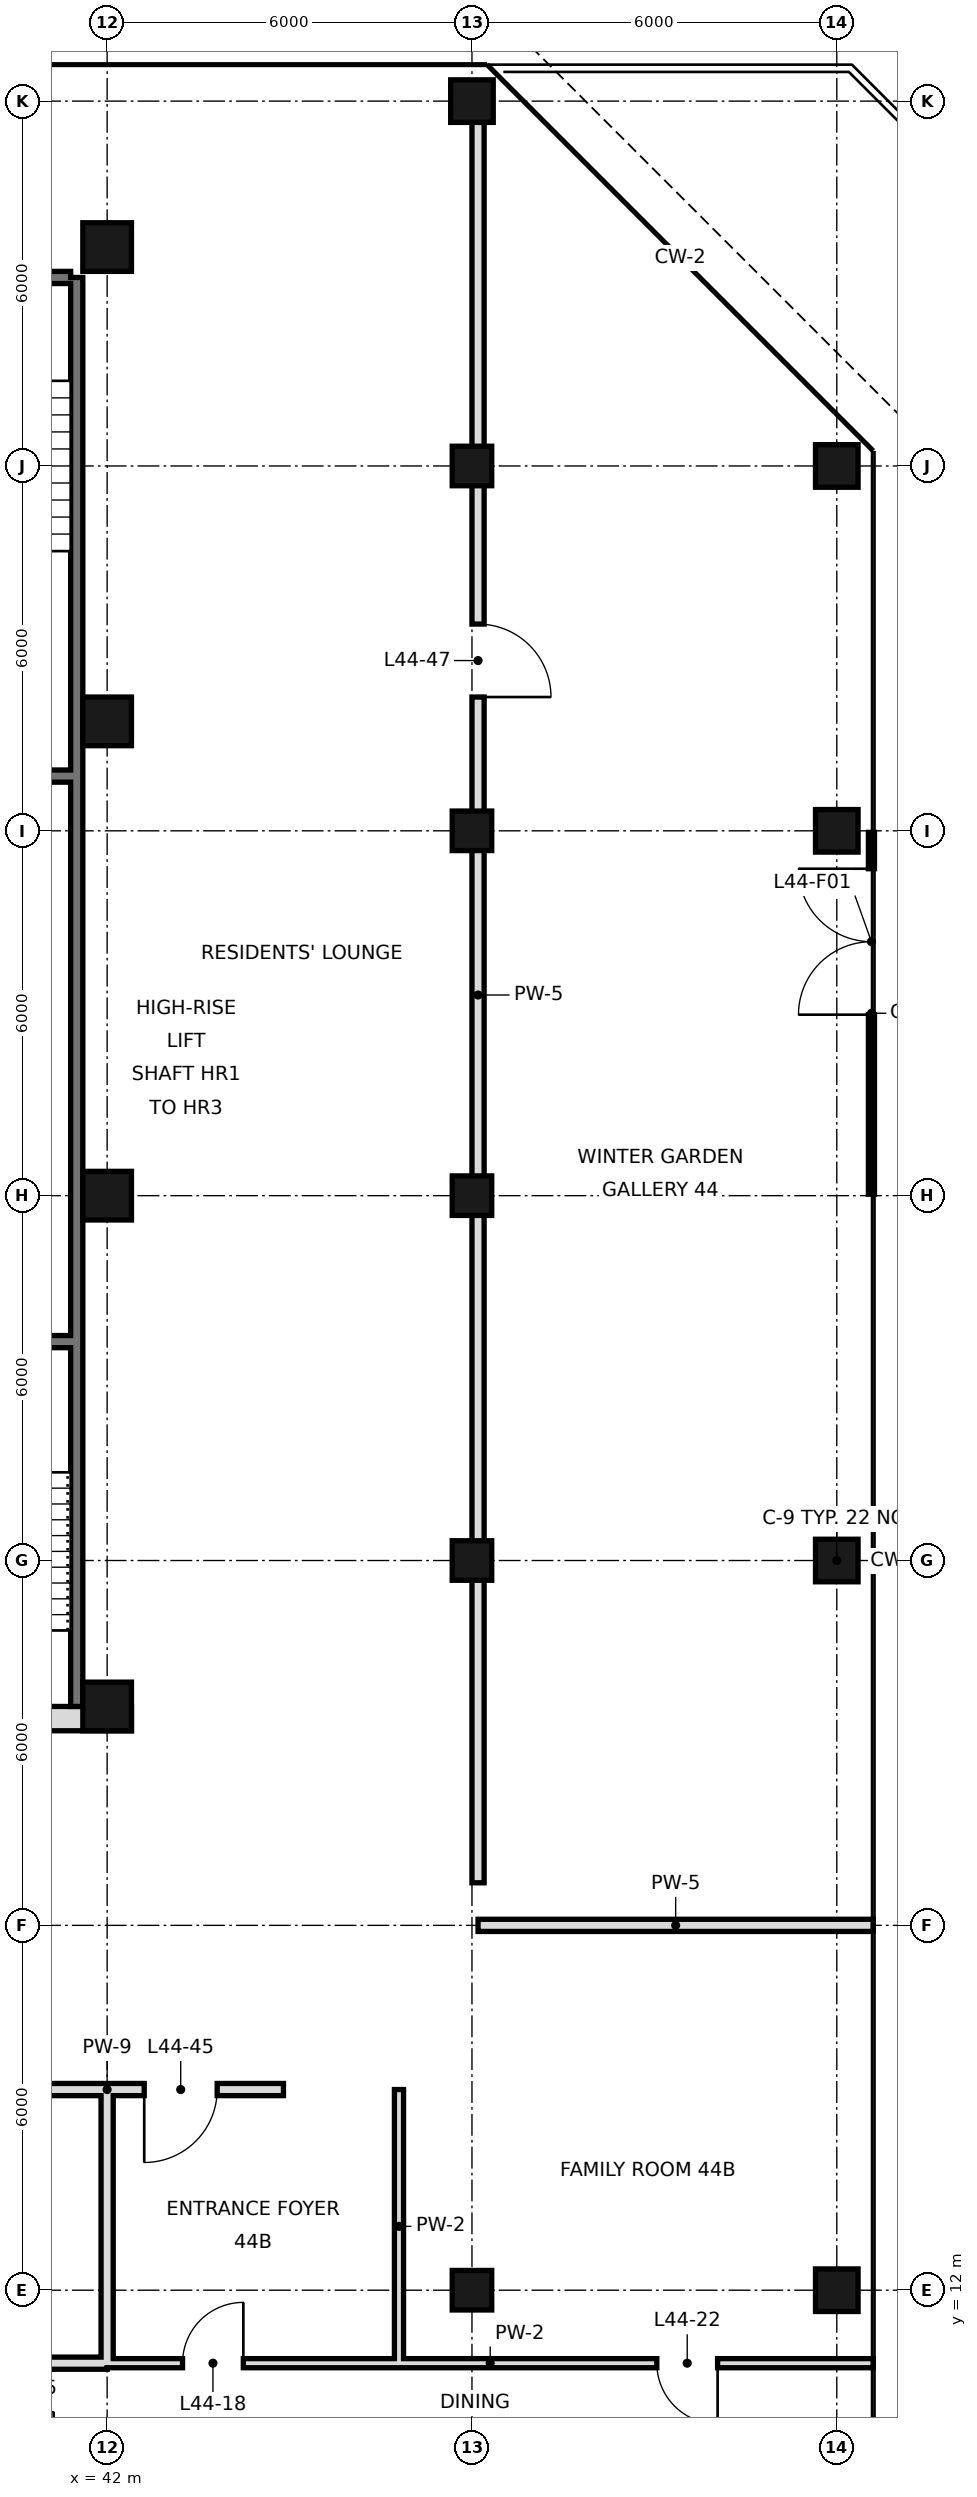
"""IFC4 building model, lengths in metres.
Left out: names, types, materials, properties, quantities, classifications, styles, units other than length and angle.
Written with IfcOpenShell. Run it as: python <this file> out.ifc"""

import sys

from ifc_helpers import new_model, si_unit, direction, frame, frame_2d, origin, origin_2d, place, context, subcontext, project, spatial, rectangle, hollow_rectangle, extrude, element, fill, save


model = new_model("IFC4")
c1 = context("Model", 3, precision=1e-05, world=origin(), true_north=direction((0.0, 1.0)))
c2 = subcontext(c1, "Body", "Model", "MODEL_VIEW")
j1 = project(units=[si_unit("LENGTHUNIT", "METRE"), si_unit("PLANEANGLEUNIT", "RADIAN")], contexts=[c1])
p1 = place(None, origin())
s1 = spatial("IfcSite", under=j1, at=p1, CompositionType="ELEMENT")
p2 = place(p1, origin())
s2 = spatial("IfcBuilding", under=s1, at=p2, CompositionType="ELEMENT")
p3 = place(p2, frame((0.0, 0.0, 192.0)))
s3 = spatial("IfcBuildingStorey", under=s2, at=p3, CompositionType="ELEMENT", Elevation=192.0)
for number, where, z_axis, x_axis in (
    (1, (42.0, 21.6, 0.0), (0.0, 0.0, 1.0), (1.0, 0.0, 0.0)),
    (2, (42.0, 30.0, 0.0), (0.0, 0.0, 1.0), (1.0, 0.0, 0.0)),
    (3, (42.0, 37.8, 0.0), (0.0, 0.0, 1.0), (1.0, 0.0, 0.0)),
    (4, (42.0, 45.6, 0.0), (0.0, 0.0, 1.0), (1.0, 0.0, 0.0)),
):
    element("IfcColumn", number, at=place(p3, frame(where, z_axis=z_axis, x_axis=x_axis)), inside=s3, PredefinedType="COLUMN", context=c2, shape_type="SweptSolid", body=[
        extrude(hollow_rectangle(XDim=0.8, YDim=0.8, WallThickness=0.045, at=origin_2d()), origin(), (0.0, 0.0, 1.0), 3.6),
    ])
for number, where, z_axis, x_axis in (
    (5, (48.0, 12.0, 0.0), (0.0, 0.0, 1.0), (1.0, 0.0, 0.0)),
    (6, (48.0, 24.0, 0.0), (0.0, 0.0, 1.0), (1.0, 0.0, 0.0)),
    (7, (48.0, 30.0, 0.0), (0.0, 0.0, 1.0), (1.0, 0.0, 0.0)),
    (8, (48.0, 36.0, 0.0), (0.0, 0.0, 1.0), (1.0, 0.0, 0.0)),
    (9, (48.0, 42.0, 0.0), (0.0, 0.0, 1.0), (1.0, 0.0, 0.0)),
):
    element("IfcColumn", number, at=place(p3, frame(where, z_axis=z_axis, x_axis=x_axis)), inside=s3, PredefinedType="COLUMN", context=c2, shape_type="SweptSolid", body=[
        extrude(hollow_rectangle(XDim=0.65, YDim=0.65, WallThickness=0.032, at=origin_2d()), origin(), (0.0, 0.0, 1.0), 3.6),
    ])
p4 = place(p3, frame((48.0, 48.0, 0.0), z_axis=(0.0, 0.0, 1.0), x_axis=(1.0, 0.0, 0.0)))
e10 = element("IfcColumn", 10, at=p4, inside=s3, PredefinedType="COLUMN", context=c2, shape_type="SweptSolid", body=[
    extrude(hollow_rectangle(XDim=0.7, YDim=0.7, WallThickness=0.036, at=origin_2d()), origin(), (0.0, 0.0, 1.0), 3.6),
])
for number, where, z_axis, x_axis in (
    (11, (54.0, 12.0, -0.3), (0.0, 0.0, 1.0), (1.0, 0.0, 0.0)),
    (12, (54.0, 24.0, -0.3), (0.0, 0.0, 1.0), (1.0, 0.0, 0.0)),
    (13, (54.0, 36.0, -0.3), (0.0, 0.0, 1.0), (1.0, 0.0, 0.0)),
    (14, (54.0, 42.0, -0.3), (0.0, 0.0, 1.0), (1.0, 0.0, 0.0)),
):
    element("IfcColumn", number, at=place(p3, frame(where, z_axis=z_axis, x_axis=x_axis)), inside=s3, PredefinedType="COLUMN", context=c2, shape_type="SweptSolid", body=[
        extrude(hollow_rectangle(XDim=0.7, YDim=0.7, WallThickness=0.036, at=origin_2d()), origin(), (0.0, 0.0, 1.0), 3.9),
    ])
p5 = place(p3, frame((54.57, 30.025, 0.0), z_axis=(0.0, 0.0, 1.0), x_axis=(0.0, 1.0, 0.0)))
e15 = element("IfcWall", 15, at=p5, inside=s3, PredefinedType="SOLIDWALL", context=c2, shape_type="SweptSolid", body=[
    extrude(rectangle(XDim=5.95, YDim=0.1, at=frame_2d((2.975, 0.0))), origin(), (0.0, 0.0, 1.0), 3.42),
])
p6 = place(p5, frame((2.951, 0.0, 0.0)))
e16 = element("IfcOpeningElement", 16, at=p6, cuts=e15, PredefinedType="OPENING", context=c2, shape_type="SweptSolid", body=[
    extrude(rectangle(XDim=2.4, YDim=2.4, at=frame_2d((1.2, 1.2))), frame((0.0, 0.06, 0.0), z_axis=(0.0, -1.0, 0.0), x_axis=(1.0, 0.0, 0.0)), (0.0, 0.0, 1.0), 0.12),
])
p7 = place(p3, frame((42.0, 10.8, 0.0), z_axis=(0.0, 0.0, 1.0), x_axis=(0.0, 1.0, 0.0)))
e17 = element("IfcWall", 17, at=p7, inside=s3, PredefinedType="SOLIDWALL", context=c2, shape_type="SweptSolid", body=[
    extrude(rectangle(XDim=4.5, YDim=0.2, at=frame_2d((2.25, 0.0))), origin(), (0.0, 0.0, 1.0), 2.72),
])
p8 = place(p3, frame((46.8, 10.8, 0.0), z_axis=(0.0, 0.0, 1.0), x_axis=(0.0, 1.0, 0.0)))
e18 = element("IfcWall", 18, at=p8, inside=s3, PredefinedType="PARTITIONING", context=c2, shape_type="SweptSolid", body=[
    extrude(rectangle(XDim=4.5, YDim=0.15, at=frame_2d((2.25, 0.0))), origin(), (0.0, 0.0, 1.0), 3.42),
])
p9 = place(p3, frame((48.1, 18.7, 0.0), z_axis=(0.0, 0.0, 1.0), x_axis=(0.0, 1.0, 0.0)))
e19 = element("IfcWall", 19, at=p9, inside=s3, PredefinedType="SOLIDWALL", context=c2, shape_type="SweptSolid", body=[
    extrude(rectangle(XDim=29.2, YDim=0.2, at=frame_2d((14.6, 0.0))), origin(), (0.0, 0.0, 1.0), 2.72),
])
p10 = place(p9, frame((19.5, 0.0, 0.0)))
e20 = element("IfcOpeningElement", 20, at=p10, cuts=e19, PredefinedType="OPENING", context=c2, shape_type="SweptSolid", body=[
    extrude(rectangle(XDim=1.2, YDim=2.4, at=frame_2d((0.6, 1.2))), frame((0.0, 0.11, 0.0), z_axis=(0.0, -1.0, 0.0), x_axis=(1.0, 0.0, 0.0)), (0.0, 0.0, 1.0), 0.22),
])
p11 = place(p3, frame((36.6, 10.8, 0.0), z_axis=(0.0, 0.0, 1.0), x_axis=(1.0, 0.0, 0.0)))
e21 = element("IfcWall", 21, at=p11, inside=s3, PredefinedType="SOLIDWALL", context=c2, shape_type="SweptSolid", body=[
    extrude(rectangle(XDim=5.4, YDim=0.2, at=frame_2d((2.7, 0.0))), origin(), (0.0, 0.0, 1.0), 2.72),
])
p12 = place(p11, frame((2.98, 0.0, 0.0)))
e22 = element("IfcOpeningElement", 22, at=p12, cuts=e21, PredefinedType="OPENING", context=c2, shape_type="SweptSolid", body=[
    extrude(rectangle(XDim=1.0, YDim=2.4, at=frame_2d((0.5, 1.2))), frame((0.0, 0.11, 0.0), z_axis=(0.0, -1.0, 0.0), x_axis=(1.0, 0.0, 0.0)), (0.0, 0.0, 1.0), 0.22),
])
p13 = place(p3, frame((42.0, 10.8, 0.0), z_axis=(0.0, 0.0, 1.0), x_axis=(1.0, 0.0, 0.0)))
e23 = element("IfcWall", 23, at=p13, inside=s3, PredefinedType="PARTITIONING", context=c2, shape_type="SweptSolid", body=[
    extrude(rectangle(XDim=12.6, YDim=0.15, at=frame_2d((6.3, 0.0))), origin(), (0.0, 0.0, 1.0), 3.42),
])
p14 = place(p13, frame((1.24, 0.0, 0.0)))
e24 = element("IfcOpeningElement", 24, at=p14, cuts=e23, PredefinedType="OPENING", context=c2, shape_type="SweptSolid", body=[
    extrude(rectangle(XDim=1.0, YDim=2.4, at=frame_2d((0.5, 1.2))), frame((0.0, 0.085, 0.0), z_axis=(0.0, -1.0, 0.0), x_axis=(1.0, 0.0, 0.0)), (0.0, 0.0, 1.0), 0.17),
])
p15 = place(p13, frame((9.04, 0.0, 0.0)))
e25 = element("IfcOpeningElement", 25, at=p15, cuts=e23, PredefinedType="OPENING", context=c2, shape_type="SweptSolid", body=[
    extrude(rectangle(XDim=1.0, YDim=2.4, at=frame_2d((0.5, 1.2))), frame((0.0, 0.085, 0.0), z_axis=(0.0, -1.0, 0.0), x_axis=(1.0, 0.0, 0.0)), (0.0, 0.0, 1.0), 0.17),
])
p16 = place(p3, frame((42.0, 15.3, 0.0), z_axis=(0.0, 0.0, 1.0), x_axis=(1.0, 0.0, 0.0)))
e26 = element("IfcWall", 26, at=p16, inside=s3, PredefinedType="SOLIDWALL", context=c2, shape_type="SweptSolid", body=[
    extrude(rectangle(XDim=2.9, YDim=0.2, at=frame_2d((1.45, 0.0))), origin(), (0.0, 0.0, 1.0), 2.72),
])
p17 = place(p16, frame((0.61, 0.0, 0.0)))
e27 = element("IfcOpeningElement", 27, at=p17, cuts=e26, PredefinedType="OPENING", context=c2, shape_type="SweptSolid", body=[
    extrude(rectangle(XDim=1.2, YDim=2.4, at=frame_2d((0.6, 1.2))), frame((0.0, 0.11, 0.0), z_axis=(0.0, -1.0, 0.0), x_axis=(1.0, 0.0, 0.0)), (0.0, 0.0, 1.0), 0.22),
])
p18 = place(p3, frame((36.6, 15.3, 0.0), z_axis=(0.0, 0.0, 1.0), x_axis=(1.0, 0.0, 0.0)))
e28 = element("IfcWall", 28, at=p18, inside=s3, PredefinedType="SOLIDWALL", context=c2, shape_type="SweptSolid", body=[
    extrude(rectangle(XDim=5.4, YDim=0.2, at=frame_2d((2.7, 0.0))), origin(), (0.0, 0.0, 1.0), 2.72),
])
p19 = place(p3, frame((48.1, 18.0, 0.0), z_axis=(0.0, 0.0, 1.0), x_axis=(1.0, 0.0, 0.0)))
e29 = element("IfcWall", 29, at=p19, inside=s3, PredefinedType="SOLIDWALL", context=c2, shape_type="SweptSolid", body=[
    extrude(rectangle(XDim=6.5, YDim=0.2, at=frame_2d((3.25, 0.0))), origin(), (0.0, 0.0, 1.0), 2.72),
])
p20 = place(p3, frame((41.5, 21.6, 0.0), z_axis=(0.0, 0.0, 1.0), x_axis=(0.0, 1.0, 0.0)))
e30 = element("IfcWall", 30, at=p20, inside=s3, PredefinedType="SOLIDWALL", context=c2, shape_type="SweptSolid", body=[
    extrude(rectangle(XDim=23.5, YDim=0.2, at=frame_2d((11.75, 0.0))), origin(), (0.0, 0.0, 1.0), 3.42),
])
p21 = place(p3, frame((6.6, 45.1, 0.0), z_axis=(0.0, 0.0, 1.0), x_axis=(1.0, 0.0, 0.0)))
e31 = element("IfcWall", 31, at=p21, inside=s3, PredefinedType="SOLIDWALL", context=c2, shape_type="SweptSolid", body=[
    extrude(rectangle(XDim=34.8, YDim=0.2, at=frame_2d((17.4, 0.0))), origin(), (0.0, 0.0, 1.0), 3.42),
])
p22 = place(p3, frame((5.6, 21.4, 0.0), z_axis=(0.0, 0.0, 1.0), x_axis=(1.0, 0.0, 0.0)))
e32 = element("IfcWall", 32, at=p22, inside=s3, PredefinedType="SOLIDWALL", context=c2, shape_type="SweptSolid", body=[
    extrude(rectangle(XDim=36.8, YDim=0.4, at=frame_2d((18.4, 0.0))), origin(), (0.0, 0.0, 1.0), 3.42),
])
p23 = place(p22, frame((8.5, 0.0, 0.0)))
e33 = element("IfcOpeningElement", 33, at=p23, cuts=e32, PredefinedType="OPENING", context=c2, shape_type="SweptSolid", body=[
    extrude(rectangle(XDim=1.8, YDim=2.1, at=frame_2d((0.9, 1.05))), frame((0.0, 0.21, 0.0), z_axis=(0.0, -1.0, 0.0), x_axis=(1.0, 0.0, 0.0)), (0.0, 0.0, 1.0), 0.42),
])
p24 = place(p22, frame((17.5, 0.0, 0.0)))
e34 = element("IfcOpeningElement", 34, at=p24, cuts=e32, PredefinedType="OPENING", context=c2, shape_type="SweptSolid", body=[
    extrude(rectangle(XDim=1.8, YDim=2.1, at=frame_2d((0.9, 1.05))), frame((0.0, 0.21, 0.0), z_axis=(0.0, -1.0, 0.0), x_axis=(1.0, 0.0, 0.0)), (0.0, 0.0, 1.0), 0.42),
])
p25 = place(p22, frame((26.5, 0.0, 0.0)))
e35 = element("IfcOpeningElement", 35, at=p25, cuts=e32, PredefinedType="OPENING", context=c2, shape_type="SweptSolid", body=[
    extrude(rectangle(XDim=1.8, YDim=2.1, at=frame_2d((0.9, 1.05))), frame((0.0, 0.21, 0.0), z_axis=(0.0, -1.0, 0.0), x_axis=(1.0, 0.0, 0.0)), (0.0, 0.0, 1.0), 0.42),
])
p26 = place(p22, frame((4.5, 0.0, 0.0)))
e36 = element("IfcOpeningElement", 36, at=p26, cuts=e32, PredefinedType="OPENING", context=c2, shape_type="SweptSolid", body=[
    extrude(rectangle(XDim=1.2, YDim=2.1, at=frame_2d((0.6, 1.05))), frame((0.0, 0.21, 0.0), z_axis=(0.0, -1.0, 0.0), x_axis=(1.0, 0.0, 0.0)), (0.0, 0.0, 1.0), 0.42),
])
p27 = place(p22, frame((31.1, 0.0, 0.0)))
e37 = element("IfcOpeningElement", 37, at=p27, cuts=e32, PredefinedType="OPENING", context=c2, shape_type="SweptSolid", body=[
    extrude(rectangle(XDim=1.2, YDim=2.1, at=frame_2d((0.6, 1.05))), frame((0.0, 0.21, 0.0), z_axis=(0.0, -1.0, 0.0), x_axis=(1.0, 0.0, 0.0)), (0.0, 0.0, 1.0), 0.42),
])
p28 = place(p3, frame((36.1, 27.6, 0.0), z_axis=(0.0, 0.0, 1.0), x_axis=(1.0, 0.0, 0.0)))
e38 = element("IfcWall", 38, at=p28, inside=s3, PredefinedType="SOLIDWALL", context=c2, shape_type="SweptSolid", body=[
    extrude(rectangle(XDim=5.3, YDim=0.2, at=frame_2d((2.65, 0.0))), origin(), (0.0, 0.0, 1.0), 3.42),
])
p29 = place(p3, frame((38.7, 36.9, 0.0), z_axis=(0.0, 0.0, 1.0), x_axis=(1.0, 0.0, 0.0)))
e39 = element("IfcWall", 39, at=p29, inside=s3, PredefinedType="SOLIDWALL", context=c2, shape_type="SweptSolid", body=[
    extrude(rectangle(XDim=2.7, YDim=0.2, at=frame_2d((1.35, 0.0))), origin(), (0.0, 0.0, 1.0), 3.42),
])
p30 = place(p6, origin())
e40 = element("IfcDoor", 40, at=p30, inside=s3, OperationType="DOUBLE_DOOR_SINGLE_SWING", PredefinedType="DOOR", context=c2, shape_type="SweptSolid", body=[
    extrude(rectangle(XDim=2.4, YDim=2.4, at=frame_2d((1.2, 1.2))), frame((0.0, 0.025, 0.0), z_axis=(0.0, -1.0, 0.0), x_axis=(1.0, 0.0, 0.0)), (0.0, 0.0, 1.0), 0.05),
])
fill(e16, e40)
p31 = place(p14, frame((1.0, 0.0, 0.0), z_axis=(0.0, 0.0, 1.0), x_axis=(-1.0, 0.0, 0.0)))
e41 = element("IfcDoor", 41, at=p31, inside=s3, OperationType="SINGLE_SWING_LEFT", PredefinedType="DOOR", context=c2, shape_type="SweptSolid", body=[
    extrude(rectangle(XDim=1.0, YDim=2.4, at=frame_2d((0.5, 1.2))), frame((0.0, 0.025, 0.0), z_axis=(0.0, -1.0, 0.0), x_axis=(1.0, 0.0, 0.0)), (0.0, 0.0, 1.0), 0.05),
])
fill(e24, e41)
p32 = place(p15, origin())
e42 = element("IfcDoor", 42, at=p32, inside=s3, OperationType="SINGLE_SWING_RIGHT", PredefinedType="DOOR", context=c2, shape_type="SweptSolid", body=[
    extrude(rectangle(XDim=1.0, YDim=2.4, at=frame_2d((0.5, 1.2))), frame((0.0, 0.025, 0.0), z_axis=(0.0, -1.0, 0.0), x_axis=(1.0, 0.0, 0.0)), (0.0, 0.0, 1.0), 0.05),
])
fill(e25, e42)
p33 = place(p17, frame((1.2, 0.0, 0.0), z_axis=(0.0, 0.0, 1.0), x_axis=(-1.0, 0.0, 0.0)))
e43 = element("IfcDoor", 43, at=p33, inside=s3, OperationType="SINGLE_SWING_RIGHT", PredefinedType="DOOR", context=c2, shape_type="SweptSolid", body=[
    extrude(rectangle(XDim=1.2, YDim=2.4, at=frame_2d((0.6, 1.2))), frame((0.0, 0.025, 0.0), z_axis=(0.0, -1.0, 0.0), x_axis=(1.0, 0.0, 0.0)), (0.0, 0.0, 1.0), 0.05),
])
fill(e27, e43)
p34 = place(p10, frame((1.2, 0.0, 0.0), z_axis=(0.0, 0.0, 1.0), x_axis=(-1.0, 0.0, 0.0)))
e44 = element("IfcDoor", 44, at=p34, inside=s3, OperationType="SINGLE_SWING_RIGHT", PredefinedType="DOOR", context=c2, shape_type="SweptSolid", body=[
    extrude(rectangle(XDim=1.2, YDim=2.4, at=frame_2d((0.6, 1.2))), frame((0.0, 0.025, 0.0), z_axis=(0.0, -1.0, 0.0), x_axis=(1.0, 0.0, 0.0)), (0.0, 0.0, 1.0), 0.05),
])
fill(e20, e44)
save(model, sys.argv[1])
